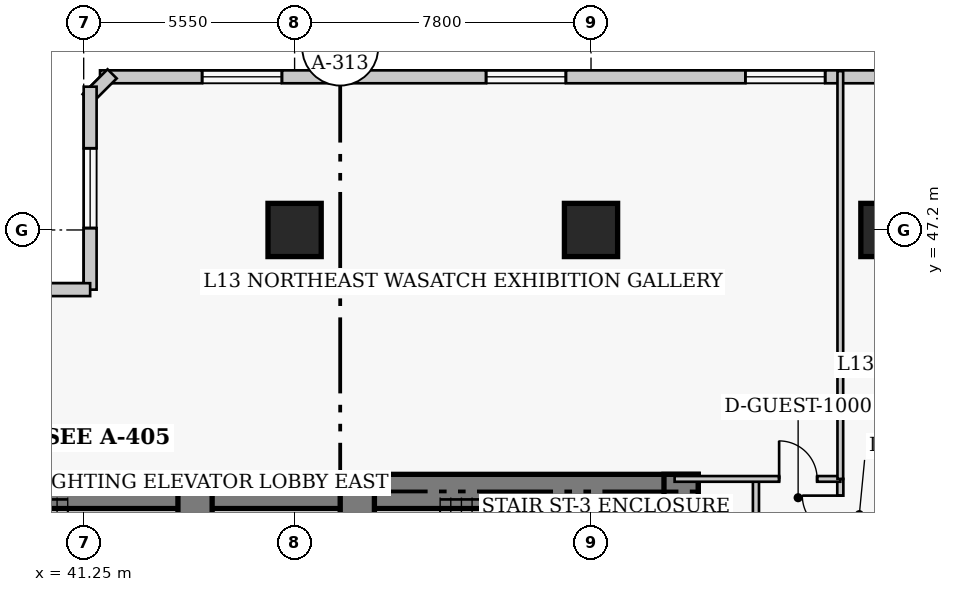
"""IFC4 building model, lengths in metres.
Left out: names, types, materials, properties, quantities, classifications, styles, units other than length and angle.
Written with IfcOpenShell. Run it as: python <this file> out.ifc"""

import sys

from ifc_helpers import new_model, si_unit, direction, frame, frame_2d, origin, origin_2d, place, context, subcontext, project, spatial, rectangle, extrude, element, fill, save


model = new_model("IFC4")
c1 = context("Model", 3, precision=1e-05, world=origin(), true_north=direction((0.0, 1.0)))
c2 = subcontext(c1, "Body", "Model", "MODEL_VIEW")
j1 = project(units=[si_unit("LENGTHUNIT", "METRE"), si_unit("PLANEANGLEUNIT", "RADIAN")], contexts=[c1])
p1 = place(None, origin())
s1 = spatial("IfcSite", under=j1, at=p1, CompositionType="ELEMENT")
p2 = place(p1, origin())
s2 = spatial("IfcBuilding", under=s1, at=p2, CompositionType="ELEMENT")
p3 = place(p2, frame((0.0, 0.0, 56.4)))
s3 = spatial("IfcBuildingStorey", under=s2, at=p3, CompositionType="ELEMENT", Elevation=56.4)
p4 = place(p3, frame((35.85, 40.32, 0.0), z_axis=(0.0, 0.0, 1.0), x_axis=(1.0, 0.0, 0.0)))
e1 = element("IfcWall", 1, at=p4, inside=s3, PredefinedType="SHEAR", context=c2, shape_type="SweptSolid", body=[
    extrude(rectangle(XDim=12.6, YDim=0.9, at=frame_2d((6.3, 0.0))), origin(), (0.0, 0.0, 1.0), 3.8),
])
p5 = place(p3, frame((48.45, 40.32, 0.0), z_axis=(0.0, 0.0, 1.0), x_axis=(1.0, 0.0, 0.0)))
e2 = element("IfcWall", 2, at=p5, inside=s3, PredefinedType="SHEAR", context=c2, shape_type="SweptSolid", body=[
    extrude(rectangle(XDim=8.97, YDim=0.9, at=frame_2d((4.485, 0.0))), origin(), (0.0, 0.0, 1.0), 3.8),
])
p6 = place(p3, frame((56.97, 27.05, 0.0), z_axis=(0.0, 0.0, 1.0), x_axis=(0.0, 1.0, 0.0)))
e3 = element("IfcWall", 3, at=p6, inside=s3, PredefinedType="SHEAR", context=c2, shape_type="SweptSolid", body=[
    extrude(rectangle(XDim=13.72, YDim=0.9, at=frame_2d((6.86, 0.0))), origin(), (0.0, 0.0, 1.0), 3.8),
])
p7 = place(p3, frame((44.18, 36.37, 0.0), z_axis=(0.0, 0.0, 1.0), x_axis=(0.0, 1.0, 0.0)))
e4 = element("IfcWall", 4, at=p7, inside=s3, PredefinedType="SHEAR", context=c2, shape_type="SweptSolid", body=[
    extrude(rectangle(XDim=3.95, YDim=0.9, at=frame_2d((1.975, 0.0))), origin(), (0.0, 0.0, 1.0), 3.8),
])
p8 = place(p3, frame((48.45, 32.3, 0.0), z_axis=(0.0, 0.0, 1.0), x_axis=(0.0, 1.0, 0.0)))
e5 = element("IfcWall", 5, at=p8, inside=s3, PredefinedType="SHEAR", context=c2, shape_type="SweptSolid", body=[
    extrude(rectangle(XDim=8.02, YDim=0.9, at=frame_2d((4.01, 0.0))), origin(), (0.0, 0.0, 1.0), 3.8),
])
p9 = place(p8, frame((5.9, 0.0, 0.0)))
e6 = element("IfcOpeningElement", 6, at=p9, cuts=e5, PredefinedType="OPENING", context=c2, shape_type="SweptSolid", body=[
    extrude(rectangle(XDim=1.1, YDim=2.15, at=frame_2d((0.55, 1.075))), frame((0.0, 0.46, 0.0), z_axis=(0.0, -1.0, 0.0), x_axis=(1.0, 0.0, 0.0)), (0.0, 0.0, 1.0), 0.92),
])
for number, where, z_axis, x_axis in (
    (7, (46.8, 47.2, 0.0), (0.0, 0.0, 1.0), (1.0, 0.0, 0.0)),
    (8, (54.6, 47.2, 0.0), (0.0, 0.0, 1.0), (1.0, 0.0, 0.0)),
    (9, (62.4, 47.2, 0.0), (0.0, 0.0, 1.0), (1.0, 0.0, 0.0)),
):
    element("IfcColumn", number, at=place(p3, frame(where, z_axis=z_axis, x_axis=x_axis)), inside=s3, PredefinedType="COLUMN", context=c2, shape_type="SweptSolid", body=[
        extrude(rectangle(XDim=1.4, YDim=1.4, at=origin_2d()), origin(), (0.0, 0.0, 1.0), 3.8),
    ])
p10 = place(p3, frame((71.57, 51.23, 0.0), z_axis=(0.0, 0.0, 1.0), x_axis=(-1.0, 0.0, 0.0)))
e10 = element("IfcWall", 10, at=p10, inside=s3, PredefinedType="SOLIDWALL", context=c2, shape_type="SweptSolid", body=[
    extrude(rectangle(XDim=29.89, YDim=0.34, at=frame_2d((14.945, 0.0))), origin(), (0.0, 0.0, 1.0), 3.54),
])
p11 = place(p10, frame((2.686, 0.0, 0.85)))
e11 = element("IfcOpeningElement", 11, at=p11, cuts=e10, PredefinedType="OPENING", context=c2, shape_type="SweptSolid", body=[
    extrude(rectangle(XDim=2.1, YDim=1.85, at=frame_2d((1.05, 0.925))), frame((0.0, 0.18, 0.0), z_axis=(0.0, -1.0, 0.0), x_axis=(1.0, 0.0, 0.0)), (0.0, 0.0, 1.0), 0.36),
])
p12 = place(p10, frame((10.809, 0.0, 0.85)))
e12 = element("IfcOpeningElement", 12, at=p12, cuts=e10, PredefinedType="OPENING", context=c2, shape_type="SweptSolid", body=[
    extrude(rectangle(XDim=2.1, YDim=1.85, at=frame_2d((1.05, 0.925))), frame((0.0, 0.18, 0.0), z_axis=(0.0, -1.0, 0.0), x_axis=(1.0, 0.0, 0.0)), (0.0, 0.0, 1.0), 0.36),
])
p13 = place(p10, frame((17.631, 0.0, 0.85)))
e13 = element("IfcOpeningElement", 13, at=p13, cuts=e10, PredefinedType="OPENING", context=c2, shape_type="SweptSolid", body=[
    extrude(rectangle(XDim=2.1, YDim=1.85, at=frame_2d((1.05, 0.925))), frame((0.0, 0.18, 0.0), z_axis=(0.0, -1.0, 0.0), x_axis=(1.0, 0.0, 0.0)), (0.0, 0.0, 1.0), 0.36),
])
p14 = place(p10, frame((25.104, 0.0, 0.85)))
e14 = element("IfcOpeningElement", 14, at=p14, cuts=e10, PredefinedType="OPENING", context=c2, shape_type="SweptSolid", body=[
    extrude(rectangle(XDim=2.1, YDim=1.85, at=frame_2d((1.05, 0.925))), frame((0.0, 0.18, 0.0), z_axis=(0.0, -1.0, 0.0), x_axis=(1.0, 0.0, 0.0)), (0.0, 0.0, 1.0), 0.36),
])
p15 = place(p3, frame((41.999, 51.308, 0.0), z_axis=(0.0, 0.0, 1.0), x_axis=(-0.707238225886, -0.706975312048, 0.0)))
e15 = element("IfcWall", 15, at=p15, inside=s3, PredefinedType="SOLIDWALL", context=c2, shape_type="SweptSolid", body=[
    extrude(rectangle(XDim=0.929, YDim=0.34, at=frame_2d((0.464, 0.0))), origin(), (0.0, 0.0, 1.0), 3.54),
])
p16 = place(p3, frame((41.42, 50.97, 0.0), z_axis=(0.0, 0.0, 1.0), x_axis=(0.0, -1.0, 0.0)))
e16 = element("IfcWall", 16, at=p16, inside=s3, PredefinedType="SOLIDWALL", context=c2, shape_type="SweptSolid", body=[
    extrude(rectangle(XDim=5.34, YDim=0.34, at=frame_2d((2.67, 0.0))), origin(), (0.0, 0.0, 1.0), 3.54),
])
p17 = place(p16, frame((1.62, 0.0, 0.85)))
e17 = element("IfcOpeningElement", 17, at=p17, cuts=e16, PredefinedType="OPENING", context=c2, shape_type="SweptSolid", body=[
    extrude(rectangle(XDim=2.1, YDim=1.85, at=frame_2d((1.05, 0.925))), frame((0.0, 0.18, 0.0), z_axis=(0.0, -1.0, 0.0), x_axis=(1.0, 0.0, 0.0)), (0.0, 0.0, 1.0), 0.36),
])
p18 = place(p3, frame((41.42, 45.63, 0.0), z_axis=(0.0, 0.0, 1.0), x_axis=(-1.0, 0.0, 0.0)))
e18 = element("IfcWall", 18, at=p18, inside=s3, PredefinedType="SOLIDWALL", context=c2, shape_type="SweptSolid", body=[
    extrude(rectangle(XDim=4.84, YDim=0.34, at=frame_2d((2.42, 0.0))), origin(), (0.0, 0.0, 1.0), 3.54),
])
p19 = place(p18, frame((1.37, 0.0, 0.85)))
e19 = element("IfcOpeningElement", 19, at=p19, cuts=e18, PredefinedType="OPENING", context=c2, shape_type="SweptSolid", body=[
    extrude(rectangle(XDim=2.1, YDim=1.85, at=frame_2d((1.05, 0.925))), frame((0.0, 0.18, 0.0), z_axis=(0.0, -1.0, 0.0), x_axis=(1.0, 0.0, 0.0)), (0.0, 0.0, 1.0), 0.36),
])
p20 = place(p3, frame((61.16, 10.25, 0.0), z_axis=(0.0, 0.0, 1.0), x_axis=(0.0, 1.0, 0.0)))
e20 = element("IfcWall", 20, at=p20, inside=s3, PredefinedType="PARTITIONING", context=c2, shape_type="SweptSolid", body=[
    extrude(rectangle(XDim=30.4, YDim=0.16, at=frame_2d((15.2, 0.0))), origin(), (0.0, 0.0, 1.0), 3.54),
])
p21 = place(p20, frame((4.4, 0.0, 0.0)))
e21 = element("IfcOpeningElement", 21, at=p21, cuts=e20, PredefinedType="OPENING", context=c2, shape_type="SweptSolid", body=[
    extrude(rectangle(XDim=0.95, YDim=2.1, at=frame_2d((0.475, 1.05))), frame((0.0, 0.09, 0.0), z_axis=(0.0, -1.0, 0.0), x_axis=(1.0, 0.0, 0.0)), (0.0, 0.0, 1.0), 0.18),
])
p22 = place(p20, frame((13.675, 0.0, 0.0)))
e22 = element("IfcOpeningElement", 22, at=p22, cuts=e20, PredefinedType="OPENING", context=c2, shape_type="SweptSolid", body=[
    extrude(rectangle(XDim=0.95, YDim=2.1, at=frame_2d((0.475, 1.05))), frame((0.0, 0.09, 0.0), z_axis=(0.0, -1.0, 0.0), x_axis=(1.0, 0.0, 0.0)), (0.0, 0.0, 1.0), 0.18),
])
p23 = place(p20, frame((21.8, 0.0, 0.0)))
e23 = element("IfcOpeningElement", 23, at=p23, cuts=e20, PredefinedType="OPENING", context=c2, shape_type="SweptSolid", body=[
    extrude(rectangle(XDim=0.95, YDim=2.1, at=frame_2d((0.475, 1.05))), frame((0.0, 0.09, 0.0), z_axis=(0.0, -1.0, 0.0), x_axis=(1.0, 0.0, 0.0)), (0.0, 0.0, 1.0), 0.18),
])
p24 = place(p20, frame((28.96, 0.0, 0.0)))
e24 = element("IfcOpeningElement", 24, at=p24, cuts=e20, PredefinedType="OPENING", context=c2, shape_type="SweptSolid", body=[
    extrude(rectangle(XDim=1.0, YDim=2.15, at=frame_2d((0.5, 1.075))), frame((0.0, 0.09, 0.0), z_axis=(0.0, -1.0, 0.0), x_axis=(1.0, 0.0, 0.0)), (0.0, 0.0, 1.0), 0.18),
])
p25 = place(p3, frame((58.94, 25.31, 0.0), z_axis=(0.0, 0.0, 1.0), x_axis=(0.0, 1.0, 0.0)))
e25 = element("IfcWall", 25, at=p25, inside=s3, PredefinedType="PARTITIONING", context=c2, shape_type="SweptSolid", body=[
    extrude(rectangle(XDim=15.34, YDim=0.16, at=frame_2d((7.67, 0.0))), origin(), (0.0, 0.0, 1.0), 3.54),
])
p26 = place(p3, frame((56.8, 40.65, 0.0), z_axis=(0.0, 0.0, 1.0), x_axis=(1.0, 0.0, 0.0)))
e26 = element("IfcWall", 26, at=p26, inside=s3, PredefinedType="PARTITIONING", context=c2, shape_type="SweptSolid", body=[
    extrude(rectangle(XDim=4.36, YDim=0.15, at=frame_2d((2.18, 0.0))), origin(), (0.0, 0.0, 1.0), 3.54),
])
p27 = place(p26, frame((2.75, 0.0, 0.0)))
e27 = element("IfcOpeningElement", 27, at=p27, cuts=e26, PredefinedType="OPENING", context=c2, shape_type="SweptSolid", body=[
    extrude(rectangle(XDim=1.0, YDim=2.15, at=frame_2d((0.5, 1.075))), frame((0.0, 0.085, 0.0), z_axis=(0.0, -1.0, 0.0), x_axis=(1.0, 0.0, 0.0)), (0.0, 0.0, 1.0), 0.17),
])
p28 = place(p3, frame((61.16, 40.65, 0.0), z_axis=(0.0, 0.0, 1.0), x_axis=(0.0, 1.0, 0.0)))
e28 = element("IfcWall", 28, at=p28, inside=s3, PredefinedType="PARTITIONING", context=c2, shape_type="SweptSolid", body=[
    extrude(rectangle(XDim=10.73, YDim=0.15, at=frame_2d((5.365, 0.0))), origin(), (0.0, 0.0, 1.0), 3.54),
])
p29 = place(p12, origin())
e29 = element("IfcWindow", 29, at=p29, inside=s3, PartitioningType="SINGLE_PANEL", PredefinedType="WINDOW", context=c2, shape_type="SweptSolid", body=[
    extrude(rectangle(XDim=2.1, YDim=1.85, at=frame_2d((1.05, 0.925))), frame((0.0, 0.03, 0.0), z_axis=(0.0, -1.0, 0.0), x_axis=(1.0, 0.0, 0.0)), (0.0, 0.0, 1.0), 0.06),
])
fill(e12, e29)
p30 = place(p13, origin())
e30 = element("IfcWindow", 30, at=p30, inside=s3, PartitioningType="SINGLE_PANEL", PredefinedType="WINDOW", context=c2, shape_type="SweptSolid", body=[
    extrude(rectangle(XDim=2.1, YDim=1.85, at=frame_2d((1.05, 0.925))), frame((0.0, 0.03, 0.0), z_axis=(0.0, -1.0, 0.0), x_axis=(1.0, 0.0, 0.0)), (0.0, 0.0, 1.0), 0.06),
])
fill(e13, e30)
p31 = place(p14, origin())
e31 = element("IfcWindow", 31, at=p31, inside=s3, PartitioningType="SINGLE_PANEL", PredefinedType="WINDOW", context=c2, shape_type="SweptSolid", body=[
    extrude(rectangle(XDim=2.1, YDim=1.85, at=frame_2d((1.05, 0.925))), frame((0.0, 0.03, 0.0), z_axis=(0.0, -1.0, 0.0), x_axis=(1.0, 0.0, 0.0)), (0.0, 0.0, 1.0), 0.06),
])
fill(e14, e31)
p32 = place(p17, origin())
e32 = element("IfcWindow", 32, at=p32, inside=s3, PartitioningType="SINGLE_PANEL", PredefinedType="WINDOW", context=c2, shape_type="SweptSolid", body=[
    extrude(rectangle(XDim=2.1, YDim=1.85, at=frame_2d((1.05, 0.925))), frame((0.0, 0.03, 0.0), z_axis=(0.0, -1.0, 0.0), x_axis=(1.0, 0.0, 0.0)), (0.0, 0.0, 1.0), 0.06),
])
fill(e17, e32)
p33 = place(p27, origin())
e33 = element("IfcDoor", 33, at=p33, inside=s3, OperationType="SINGLE_SWING_LEFT", PredefinedType="DOOR", context=c2, shape_type="SweptSolid", body=[
    extrude(rectangle(XDim=1.0, YDim=2.15, at=frame_2d((0.5, 1.075))), frame((0.0, 0.025, 0.0), z_axis=(0.0, -1.0, 0.0), x_axis=(1.0, 0.0, 0.0)), (0.0, 0.0, 1.0), 0.05),
])
fill(e27, e33)
p34 = place(p24, origin())
e34 = element("IfcDoor", 34, at=p34, inside=s3, OperationType="SINGLE_SWING_RIGHT", PredefinedType="DOOR", context=c2, shape_type="SweptSolid", body=[
    extrude(rectangle(XDim=1.0, YDim=2.15, at=frame_2d((0.5, 1.075))), frame((0.0, 0.025, 0.0), z_axis=(0.0, -1.0, 0.0), x_axis=(1.0, 0.0, 0.0)), (0.0, 0.0, 1.0), 0.05),
])
fill(e24, e34)
save(model, sys.argv[1])
